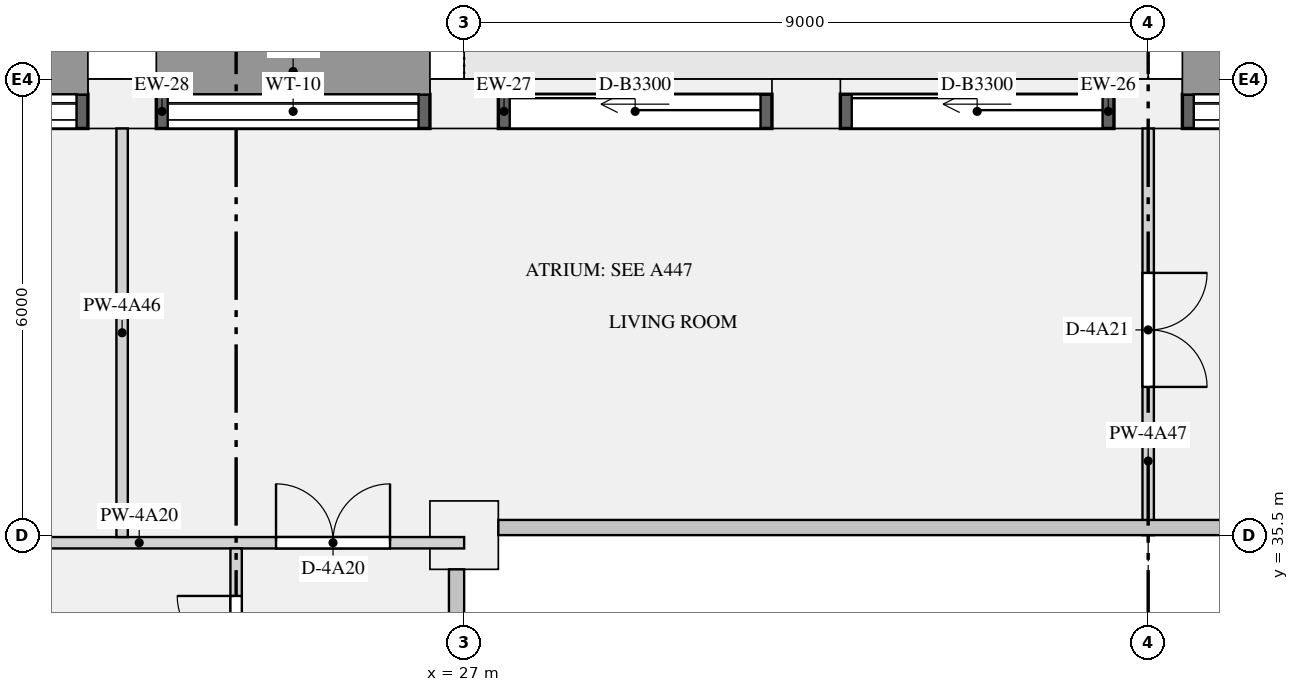
"""IFC4 building model, lengths in metres.
Left out: names, types, materials, properties, quantities, classifications, styles, units other than length and angle.
Written with IfcOpenShell. Run it as: python <this file> out.ifc"""

import sys

from ifc_helpers import new_model, si_unit, direction, frame, frame_2d, origin, origin_2d, place, context, subcontext, project, spatial, rectangle, extrude, element, fill, save


model = new_model("IFC4")
c1 = context("Model", 3, precision=1e-05, world=origin(), true_north=direction((0.0, 1.0)))
c2 = subcontext(c1, "Body", "Model", "MODEL_VIEW")
j1 = project(units=[si_unit("LENGTHUNIT", "METRE"), si_unit("PLANEANGLEUNIT", "RADIAN")], contexts=[c1])
p1 = place(None, origin())
s1 = spatial("IfcSite", under=j1, at=p1, CompositionType="ELEMENT")
p2 = place(p1, origin())
s2 = spatial("IfcBuilding", under=s1, at=p2, CompositionType="ELEMENT")
p3 = place(p2, frame((0.0, 0.0, 198.0)))
s3 = spatial("IfcBuildingStorey", under=s2, at=p3, CompositionType="ELEMENT", Elevation=198.0)
for number, where, z_axis, x_axis in (
    (1, (36.0, 41.175, 0.0), (0.0, 0.0, 1.0), (-1.0, 0.0, 0.0)),
    (2, (31.5, 41.175, 0.0), (0.0, 0.0, 1.0), (-1.0, 0.0, 0.0)),
    (3, (27.0, 41.175, 0.0), (0.0, 0.0, 1.0), (-1.0, 0.0, 0.0)),
    (4, (22.5, 41.175, 0.0), (0.0, 0.0, 1.0), (-1.0, 0.0, 0.0)),
):
    element("IfcColumn", number, at=place(p3, frame(where, z_axis=z_axis, x_axis=x_axis)), inside=s3, PredefinedType="USERDEFINED", context=c2, shape_type="SweptSolid", body=[
        extrude(rectangle(XDim=0.9, YDim=0.65, at=origin_2d()), origin(), (0.0, 0.0, 1.0), 3.15),
    ])
p4 = place(p3, frame((27.0, 35.5, 0.0), z_axis=(0.0, 0.0, 1.0), x_axis=(1.0, 0.0, 0.0)))
e5 = element("IfcColumn", 5, at=p4, inside=s3, PredefinedType="COLUMN", context=c2, shape_type="SweptSolid", body=[
    extrude(rectangle(XDim=0.9, YDim=0.9, at=origin_2d()), origin(), (0.0, 0.0, 1.0), 3.15),
])
p5 = place(p3, frame((40.05, 41.075, 0.9), z_axis=(0.0, 0.0, 1.0), x_axis=(-1.0, 0.0, 0.0)))
e6 = element("IfcWall", 6, at=p5, inside=s3, PredefinedType="SOLIDWALL", context=c2, shape_type="SweptSolid", body=[
    extrude(rectangle(XDim=3.6, YDim=0.45, at=frame_2d((1.8, 0.0))), origin(), (0.0, 0.0, 1.0), 1.93),
])
p6 = place(p5, frame((0.15, 0.0, 0.15)))
e7 = element("IfcOpeningElement", 7, at=p6, cuts=e6, PredefinedType="OPENING", context=c2, shape_type="SweptSolid", body=[
    extrude(rectangle(XDim=3.3, YDim=1.5, at=frame_2d((1.65, 0.75))), frame((0.0, 0.235, 0.0), z_axis=(0.0, -1.0, 0.0), x_axis=(1.0, 0.0, 0.0)), (0.0, 0.0, 1.0), 0.47),
])
p7 = place(p3, frame((35.55, 41.075, 0.0), z_axis=(0.0, 0.0, 1.0), x_axis=(-1.0, 0.0, 0.0)))
e8 = element("IfcWall", 8, at=p7, inside=s3, PredefinedType="SOLIDWALL", context=c2, shape_type="SweptSolid", body=[
    extrude(rectangle(XDim=3.6, YDim=0.45, at=frame_2d((1.8, 0.0))), origin(), (0.0, 0.0, 1.0), 2.83),
])
p8 = place(p7, frame((0.15, 0.0, 0.0)))
e9 = element("IfcOpeningElement", 9, at=p8, cuts=e8, PredefinedType="OPENING", context=c2, shape_type="SweptSolid", body=[
    extrude(rectangle(XDim=3.3, YDim=2.3, at=frame_2d((1.65, 1.15))), frame((0.0, 0.235, 0.0), z_axis=(0.0, -1.0, 0.0), x_axis=(1.0, 0.0, 0.0)), (0.0, 0.0, 1.0), 0.47),
])
p9 = place(p3, frame((31.05, 41.075, 0.0), z_axis=(0.0, 0.0, 1.0), x_axis=(-1.0, 0.0, 0.0)))
e10 = element("IfcWall", 10, at=p9, inside=s3, PredefinedType="SOLIDWALL", context=c2, shape_type="SweptSolid", body=[
    extrude(rectangle(XDim=3.6, YDim=0.45, at=frame_2d((1.8, 0.0))), origin(), (0.0, 0.0, 1.0), 2.83),
])
p10 = place(p9, frame((0.15, 0.0, 0.0)))
e11 = element("IfcOpeningElement", 11, at=p10, cuts=e10, PredefinedType="OPENING", context=c2, shape_type="SweptSolid", body=[
    extrude(rectangle(XDim=3.3, YDim=2.3, at=frame_2d((1.65, 1.15))), frame((0.0, 0.235, 0.0), z_axis=(0.0, -1.0, 0.0), x_axis=(1.0, 0.0, 0.0)), (0.0, 0.0, 1.0), 0.47),
])
p11 = place(p3, frame((26.55, 41.075, 0.9), z_axis=(0.0, 0.0, 1.0), x_axis=(-1.0, 0.0, 0.0)))
e12 = element("IfcWall", 12, at=p11, inside=s3, PredefinedType="SOLIDWALL", context=c2, shape_type="SweptSolid", body=[
    extrude(rectangle(XDim=3.6, YDim=0.45, at=frame_2d((1.8, 0.0))), origin(), (0.0, 0.0, 1.0), 1.93),
])
p12 = place(p11, frame((0.15, 0.0, 0.15)))
e13 = element("IfcOpeningElement", 13, at=p12, cuts=e12, PredefinedType="OPENING", context=c2, shape_type="SweptSolid", body=[
    extrude(rectangle(XDim=3.3, YDim=1.5, at=frame_2d((1.65, 0.75))), frame((0.0, 0.235, 0.0), z_axis=(0.0, -1.0, 0.0), x_axis=(1.0, 0.0, 0.0)), (0.0, 0.0, 1.0), 0.47),
])
p13 = place(p3, frame((22.05, 41.075, 0.9), z_axis=(0.0, 0.0, 1.0), x_axis=(-1.0, 0.0, 0.0)))
e14 = element("IfcWall", 14, at=p13, inside=s3, PredefinedType="SOLIDWALL", context=c2, shape_type="SweptSolid", body=[
    extrude(rectangle(XDim=3.6, YDim=0.45, at=frame_2d((1.8, 0.0))), origin(), (0.0, 0.0, 1.0), 1.93),
])
p14 = place(p13, frame((0.15, 0.0, 0.15)))
e15 = element("IfcOpeningElement", 15, at=p14, cuts=e14, PredefinedType="OPENING", context=c2, shape_type="SweptSolid", body=[
    extrude(rectangle(XDim=3.3, YDim=1.5, at=frame_2d((1.65, 0.75))), frame((0.0, 0.235, 0.0), z_axis=(0.0, -1.0, 0.0), x_axis=(1.0, 0.0, 0.0)), (0.0, 0.0, 1.0), 0.47),
])
p15 = place(p3, frame((15.8, 35.4, 0.0), z_axis=(0.0, 0.0, 1.0), x_axis=(1.0, 0.0, 0.0)))
e16 = element("IfcWall", 16, at=p15, inside=s3, PredefinedType="PARTITIONING", context=c2, shape_type="SweptSolid", body=[
    extrude(rectangle(XDim=11.2, YDim=0.15, at=frame_2d((5.6, 0.0))), origin(), (0.0, 0.0, 1.0), 2.83),
])
p16 = place(p15, frame((0.425, 0.0, 0.0)))
e17 = element("IfcOpeningElement", 17, at=p16, cuts=e16, PredefinedType="OPENING", context=c2, shape_type="SweptSolid", body=[
    extrude(rectangle(XDim=0.9, YDim=2.1, at=frame_2d((0.45, 1.05))), frame((0.0, 0.085, 0.0), z_axis=(0.0, -1.0, 0.0), x_axis=(1.0, 0.0, 0.0)), (0.0, 0.0, 1.0), 0.17),
])
p17 = place(p15, frame((4.225, 0.0, 0.0)))
e18 = element("IfcOpeningElement", 18, at=p17, cuts=e16, PredefinedType="OPENING", context=c2, shape_type="SweptSolid", body=[
    extrude(rectangle(XDim=0.9, YDim=2.1, at=frame_2d((0.45, 1.05))), frame((0.0, 0.085, 0.0), z_axis=(0.0, -1.0, 0.0), x_axis=(1.0, 0.0, 0.0)), (0.0, 0.0, 1.0), 0.17),
])
p18 = place(p15, frame((8.725, 0.0, 0.0)))
e19 = element("IfcOpeningElement", 19, at=p18, cuts=e16, PredefinedType="OPENING", context=c2, shape_type="SweptSolid", body=[
    extrude(rectangle(XDim=1.5, YDim=2.1, at=frame_2d((0.75, 1.05))), frame((0.0, 0.085, 0.0), z_axis=(0.0, -1.0, 0.0), x_axis=(1.0, 0.0, 0.0)), (0.0, 0.0, 1.0), 0.17),
])
p19 = place(p3, frame((24.0, 27.075, 0.0), z_axis=(0.0, 0.0, 1.0), x_axis=(0.0, 1.0, 0.0)))
e20 = element("IfcWall", 20, at=p19, inside=s3, PredefinedType="PARTITIONING", context=c2, shape_type="SweptSolid", body=[
    extrude(rectangle(XDim=8.25, YDim=0.15, at=frame_2d((4.125, 0.0))), origin(), (0.0, 0.0, 1.0), 2.83),
])
p20 = place(p19, frame((6.125, 0.0, 0.0)))
e21 = element("IfcOpeningElement", 21, at=p20, cuts=e20, PredefinedType="OPENING", context=c2, shape_type="SweptSolid", body=[
    extrude(rectangle(XDim=1.5, YDim=2.1, at=frame_2d((0.75, 1.05))), frame((0.0, 0.085, 0.0), z_axis=(0.0, -1.0, 0.0), x_axis=(1.0, 0.0, 0.0)), (0.0, 0.0, 1.0), 0.17),
])
p21 = place(p3, frame((22.5, 35.475, 0.0), z_axis=(0.0, 0.0, 1.0), x_axis=(0.0, 1.0, 0.0)))
e22 = element("IfcWall", 22, at=p21, inside=s3, PredefinedType="PARTITIONING", context=c2, shape_type="SweptSolid", body=[
    extrude(rectangle(XDim=5.375, YDim=0.15, at=frame_2d((2.688, 0.0))), origin(), (0.0, 0.0, 1.0), 2.83),
])
p22 = place(p3, frame((36.0, 35.5, 0.0), z_axis=(0.0, 0.0, 1.0), x_axis=(0.0, 1.0, 0.0)))
e23 = element("IfcWall", 23, at=p22, inside=s3, PredefinedType="PARTITIONING", context=c2, shape_type="SweptSolid", body=[
    extrude(rectangle(XDim=5.35, YDim=0.15, at=frame_2d((2.675, 0.0))), origin(), (0.0, 0.0, 1.0), 2.83),
])
p23 = place(p22, frame((1.95, 0.0, 0.0)))
e24 = element("IfcOpeningElement", 24, at=p23, cuts=e23, PredefinedType="OPENING", context=c2, shape_type="SweptSolid", body=[
    extrude(rectangle(XDim=1.5, YDim=2.1, at=frame_2d((0.75, 1.05))), frame((0.0, 0.085, 0.0), z_axis=(0.0, -1.0, 0.0), x_axis=(1.0, 0.0, 0.0)), (0.0, 0.0, 1.0), 0.17),
])
p24 = place(p6, origin())
e25 = element("IfcWindow", 25, at=p24, inside=s3, PartitioningType="SINGLE_PANEL", PredefinedType="WINDOW", context=c2, shape_type="SweptSolid", body=[
    extrude(rectangle(XDim=3.3, YDim=1.5, at=frame_2d((1.65, 0.75))), frame((0.0, -0.065, 0.0), z_axis=(0.0, -1.0, 0.0), x_axis=(1.0, 0.0, 0.0)), (0.0, 0.0, 1.0), 0.06),
])
fill(e7, e25)
p25 = place(p8, origin())
e26 = element("IfcDoor", 26, at=p25, inside=s3, OperationType="SLIDING_TO_LEFT", PredefinedType="DOOR", context=c2, shape_type="SweptSolid", body=[
    extrude(rectangle(XDim=3.3, YDim=2.3, at=frame_2d((1.65, 1.15))), frame((0.0, -0.07, 0.0), z_axis=(0.0, -1.0, 0.0), x_axis=(1.0, 0.0, 0.0)), (0.0, 0.0, 1.0), 0.05),
])
fill(e9, e26)
p26 = place(p10, origin())
e27 = element("IfcDoor", 27, at=p26, inside=s3, OperationType="SLIDING_TO_LEFT", PredefinedType="DOOR", context=c2, shape_type="SweptSolid", body=[
    extrude(rectangle(XDim=3.3, YDim=2.3, at=frame_2d((1.65, 1.15))), frame((0.0, -0.07, 0.0), z_axis=(0.0, -1.0, 0.0), x_axis=(1.0, 0.0, 0.0)), (0.0, 0.0, 1.0), 0.05),
])
fill(e11, e27)
p27 = place(p12, origin())
e28 = element("IfcWindow", 28, at=p27, inside=s3, PartitioningType="SINGLE_PANEL", PredefinedType="WINDOW", context=c2, shape_type="SweptSolid", body=[
    extrude(rectangle(XDim=3.3, YDim=1.5, at=frame_2d((1.65, 0.75))), frame((0.0, -0.065, 0.0), z_axis=(0.0, -1.0, 0.0), x_axis=(1.0, 0.0, 0.0)), (0.0, 0.0, 1.0), 0.06),
])
fill(e13, e28)
p28 = place(p14, origin())
e29 = element("IfcWindow", 29, at=p28, inside=s3, PartitioningType="SINGLE_PANEL", PredefinedType="WINDOW", context=c2, shape_type="SweptSolid", body=[
    extrude(rectangle(XDim=3.3, YDim=1.5, at=frame_2d((1.65, 0.75))), frame((0.0, -0.065, 0.0), z_axis=(0.0, -1.0, 0.0), x_axis=(1.0, 0.0, 0.0)), (0.0, 0.0, 1.0), 0.06),
])
fill(e15, e29)
p29 = place(p20, origin())
e30 = element("IfcDoor", 30, at=p29, inside=s3, OperationType="DOUBLE_DOOR_SINGLE_SWING", PredefinedType="DOOR", context=c2, shape_type="SweptSolid", body=[
    extrude(rectangle(XDim=1.5, YDim=2.1, at=frame_2d((0.75, 1.05))), frame((0.0, 0.025, 0.0), z_axis=(0.0, -1.0, 0.0), x_axis=(1.0, 0.0, 0.0)), (0.0, 0.0, 1.0), 0.05),
])
fill(e21, e30)
p30 = place(p18, origin())
e31 = element("IfcDoor", 31, at=p30, inside=s3, OperationType="DOUBLE_DOOR_SINGLE_SWING", PredefinedType="DOOR", context=c2, shape_type="SweptSolid", body=[
    extrude(rectangle(XDim=1.5, YDim=2.1, at=frame_2d((0.75, 1.05))), frame((0.0, 0.025, 0.0), z_axis=(0.0, -1.0, 0.0), x_axis=(1.0, 0.0, 0.0)), (0.0, 0.0, 1.0), 0.05),
])
fill(e19, e31)
p31 = place(p23, frame((1.5, 0.0, 0.0), z_axis=(0.0, 0.0, 1.0), x_axis=(-1.0, 0.0, 0.0)))
e32 = element("IfcDoor", 32, at=p31, inside=s3, OperationType="DOUBLE_DOOR_SINGLE_SWING", PredefinedType="DOOR", context=c2, shape_type="SweptSolid", body=[
    extrude(rectangle(XDim=1.5, YDim=2.1, at=frame_2d((0.75, 1.05))), frame((0.0, 0.025, 0.0), z_axis=(0.0, -1.0, 0.0), x_axis=(1.0, 0.0, 0.0)), (0.0, 0.0, 1.0), 0.05),
])
fill(e24, e32)
save(model, sys.argv[1])
